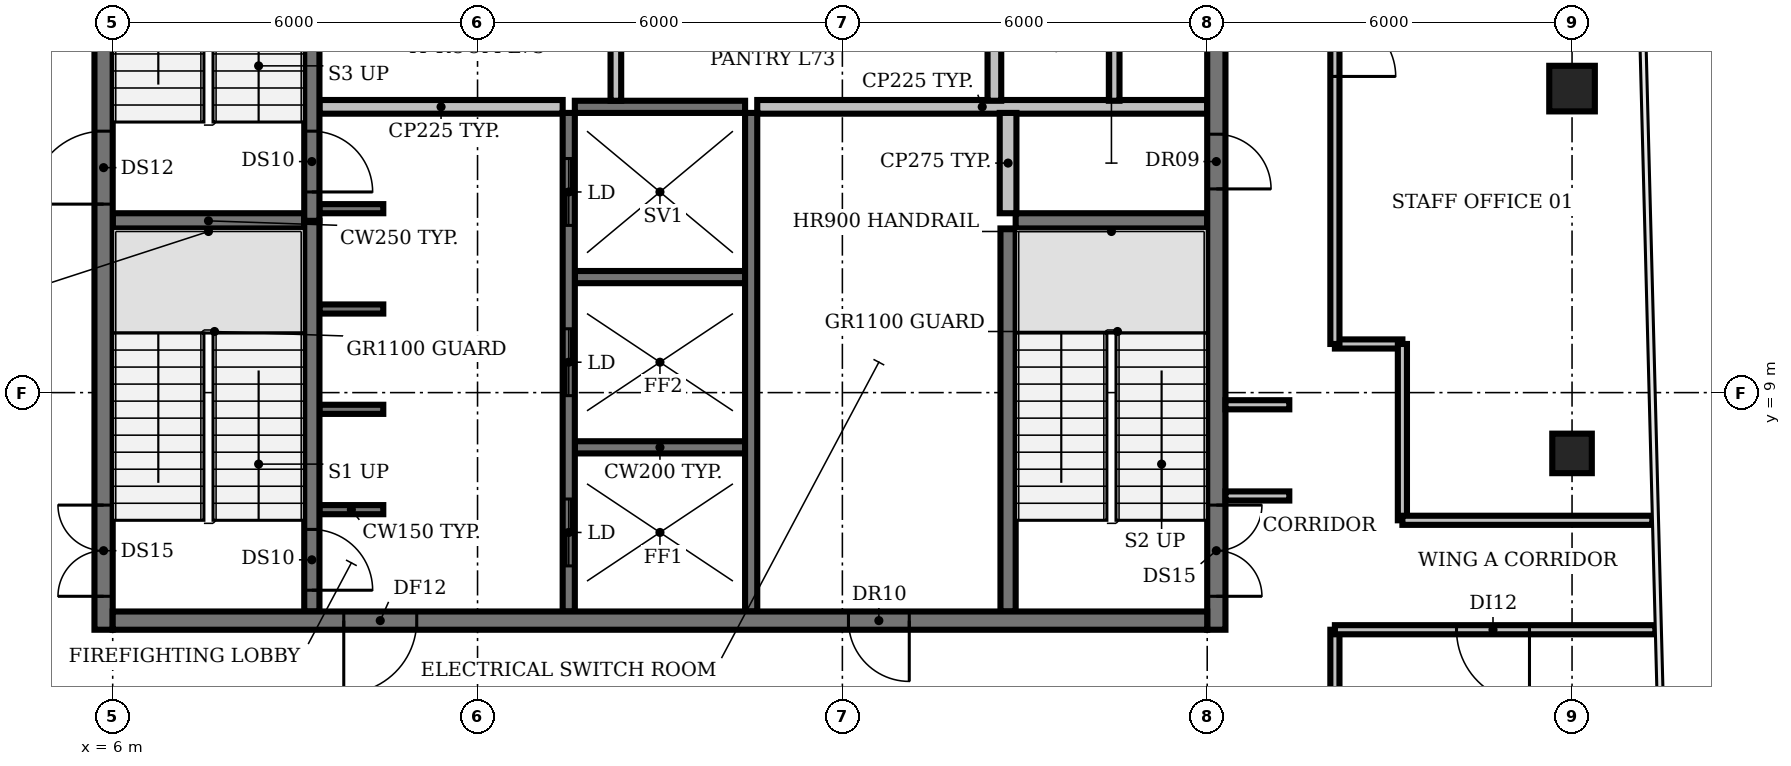
"""IFC4 building model, lengths in metres.
Left out: names, types, materials, properties, quantities, classifications, styles, units other than length and angle.
Written with IfcOpenShell. Run it as: python <this file> out.ifc"""

import sys

from ifc_helpers import new_model, si_unit, direction, frame, frame_2d, origin, origin_2d, place, context, subcontext, project, spatial, rectangle, circle, extrude, element, fill, save


model = new_model("IFC4")
c1 = context("Model", 3, precision=1e-05, world=origin(), true_north=direction((0.0, 1.0)))
c2 = subcontext(c1, "Body", "Model", "MODEL_VIEW")
j1 = project(units=[si_unit("LENGTHUNIT", "METRE"), si_unit("PLANEANGLEUNIT", "RADIAN")], contexts=[c1])
p1 = place(None, origin())
s1 = spatial("IfcSite", under=j1, at=p1, CompositionType="ELEMENT")
p2 = place(p1, origin())
s2 = spatial("IfcBuilding", under=s1, at=p2, CompositionType="ELEMENT")
p3 = place(p2, frame((0.0, 0.0, 327.2)))
s3 = spatial("IfcBuildingStorey", under=s2, at=p3, CompositionType="ELEMENT", Elevation=327.2)
p4 = place(p3, frame((30.0, 8.0, 0.0), z_axis=(0.0, 0.0, 1.0), x_axis=(1.0, 0.0, 0.0)))
e1 = element("IfcColumn", 1, at=p4, inside=s3, PredefinedType="COLUMN", context=c2, shape_type="SweptSolid", body=[
    extrude(rectangle(XDim=0.65, YDim=0.65, at=origin_2d()), origin(), (0.0, 0.0, 1.0), 3.9),
])
p5 = place(p3, frame((30.0, 14.0, 0.0), z_axis=(0.0, 0.0, 1.0), x_axis=(1.0, 0.0, 0.0)))
e2 = element("IfcColumn", 2, at=p5, inside=s3, PredefinedType="COLUMN", context=c2, shape_type="SweptSolid", body=[
    extrude(circle(Radius=0.375, at=origin_2d()), origin(), (0.0, 0.0, 1.0), 3.9),
])
p6 = place(p3, frame((9.4, 7.075, 0.0), z_axis=(0.0, 0.0, 1.0), x_axis=(1.0, 0.0, 0.0)))
e3 = element("IfcWall", 3, at=p6, inside=s3, PredefinedType="SHEAR", context=c2, shape_type="SweptSolid", body=[
    extrude(rectangle(XDim=1.05, YDim=0.15, at=frame_2d((0.525, 0.0))), origin(), (0.0, 0.0, 1.0), 3.9),
])
p7 = place(p3, frame((13.6, 8.1, 0.0), z_axis=(0.0, 0.0, 1.0), x_axis=(1.0, 0.0, 0.0)))
e4 = element("IfcWall", 4, at=p7, inside=s3, PredefinedType="SHEAR", context=c2, shape_type="SweptSolid", body=[
    extrude(rectangle(XDim=2.8, YDim=0.2, at=frame_2d((1.4, 0.0))), origin(), (0.0, 0.0, 1.0), 3.9),
])
for number, where, z_axis, x_axis in (
    (5, (9.4, 8.725, 0.0), (0.0, 0.0, 1.0), (1.0, 0.0, 0.0)),
    (6, (9.4, 10.375, 0.0), (0.0, 0.0, 1.0), (1.0, 0.0, 0.0)),
):
    element("IfcWall", number, at=place(p3, frame(where, z_axis=z_axis, x_axis=x_axis)), inside=s3, PredefinedType="SHEAR", context=c2, shape_type="SweptSolid", body=[
        extrude(rectangle(XDim=1.05, YDim=0.15, at=frame_2d((0.525, 0.0))), origin(), (0.0, 0.0, 1.0), 3.9),
    ])
p8 = place(p3, frame((13.6, 10.9, 0.0), z_axis=(0.0, 0.0, 1.0), x_axis=(1.0, 0.0, 0.0)))
e7 = element("IfcWall", 7, at=p8, inside=s3, PredefinedType="SHEAR", context=c2, shape_type="SweptSolid", body=[
    extrude(rectangle(XDim=2.8, YDim=0.2, at=frame_2d((1.4, 0.0))), origin(), (0.0, 0.0, 1.0), 3.9),
])
for number, where, z_axis, x_axis in (
    (8, (6.0, 11.825, 0.0), (0.0, 0.0, 1.0), (1.0, 0.0, 0.0)),
    (9, (20.85, 11.825, 0.0), (0.0, 0.0, 1.0), (1.0, 0.0, 0.0)),
):
    element("IfcWall", number, at=place(p3, frame(where, z_axis=z_axis, x_axis=x_axis)), inside=s3, PredefinedType="SHEAR", context=c2, shape_type="SweptSolid", body=[
        extrude(rectangle(XDim=3.15, YDim=0.25, at=frame_2d((1.575, 0.0))), origin(), (0.0, 0.0, 1.0), 3.9),
    ])
p9 = place(p3, frame((9.4, 12.025, 0.0), z_axis=(0.0, 0.0, 1.0), x_axis=(1.0, 0.0, 0.0)))
e10 = element("IfcWall", 10, at=p9, inside=s3, PredefinedType="SHEAR", context=c2, shape_type="SweptSolid", body=[
    extrude(rectangle(XDim=1.05, YDim=0.15, at=frame_2d((0.525, 0.0))), origin(), (0.0, 0.0, 1.0), 3.9),
])
p10 = place(p3, frame((9.4, 13.7, 0.0), z_axis=(0.0, 0.0, 1.0), x_axis=(1.0, 0.0, 0.0)))
e11 = element("IfcWall", 11, at=p10, inside=s3, PredefinedType="PARTITIONING", context=c2, shape_type="SweptSolid", body=[
    extrude(rectangle(XDim=4.0, YDim=0.225, at=frame_2d((2.0, 0.0))), origin(), (0.0, 0.0, 1.0), 3.9),
])
p11 = place(p3, frame((13.6, 13.7, 0.0), z_axis=(0.0, 0.0, 1.0), x_axis=(1.0, 0.0, 0.0)))
e12 = element("IfcWall", 12, at=p11, inside=s3, PredefinedType="SHEAR", context=c2, shape_type="SweptSolid", body=[
    extrude(rectangle(XDim=2.8, YDim=0.2, at=frame_2d((1.4, 0.0))), origin(), (0.0, 0.0, 1.0), 3.9),
])
p12 = place(p3, frame((16.6, 13.7, 0.0), z_axis=(0.0, 0.0, 1.0), x_axis=(1.0, 0.0, 0.0)))
e13 = element("IfcWall", 13, at=p12, inside=s3, PredefinedType="PARTITIONING", context=c2, shape_type="SweptSolid", body=[
    extrude(rectangle(XDim=7.4, YDim=0.225, at=frame_2d((3.7, 0.0))), origin(), (0.0, 0.0, 1.0), 3.9),
])
p13 = place(p3, frame((9.275, 11.825, 0.0), z_axis=(0.0, 0.0, 1.0), x_axis=(0.0, -1.0, 0.0)))
e14 = element("IfcWall", 14, at=p13, inside=s3, PredefinedType="SHEAR", context=c2, shape_type="SweptSolid", body=[
    extrude(rectangle(XDim=6.425, YDim=0.25, at=frame_2d((3.212, 0.0))), origin(), (0.0, 0.0, 1.0), 3.9),
])
p14 = place(p13, frame((5.075, 0.0, 0.0)))
e15 = element("IfcOpeningElement", 15, at=p14, cuts=e14, PredefinedType="OPENING", context=c2, shape_type="SweptSolid", body=[
    extrude(rectangle(XDim=1.0, YDim=2.1, at=frame_2d((0.5, 1.05))), frame((0.0, 0.135, 0.0), z_axis=(0.0, -1.0, 0.0), x_axis=(1.0, 0.0, 0.0)), (0.0, 0.0, 1.0), 0.27),
])
p15 = place(p3, frame((9.275, 18.375, 0.0), z_axis=(0.0, 0.0, 1.0), x_axis=(0.0, -1.0, 0.0)))
e16 = element("IfcWall", 16, at=p15, inside=s3, PredefinedType="SHEAR", context=c2, shape_type="SweptSolid", body=[
    extrude(rectangle(XDim=6.55, YDim=0.25, at=frame_2d((3.275, 0.0))), origin(), (0.0, 0.0, 1.0), 3.9),
])
p16 = place(p15, frame((5.075, 0.0, 0.0)))
e17 = element("IfcOpeningElement", 17, at=p16, cuts=e16, PredefinedType="OPENING", context=c2, shape_type="SweptSolid", body=[
    extrude(rectangle(XDim=1.0, YDim=2.1, at=frame_2d((0.5, 1.05))), frame((0.0, 0.135, 0.0), z_axis=(0.0, -1.0, 0.0), x_axis=(1.0, 0.0, 0.0)), (0.0, 0.0, 1.0), 0.27),
])
p17 = place(p3, frame((13.5, 5.4, 0.0), z_axis=(0.0, 0.0, 1.0), x_axis=(0.0, 1.0, 0.0)))
e18 = element("IfcWall", 18, at=p17, inside=s3, PredefinedType="SHEAR", context=c2, shape_type="SweptSolid", body=[
    extrude(rectangle(XDim=8.2, YDim=0.2, at=frame_2d((4.1, 0.0))), origin(), (0.0, 0.0, 1.0), 3.9),
])
p18 = place(p17, frame((0.75, 0.0, 0.0)))
e19 = element("IfcOpeningElement", 19, at=p18, cuts=e18, PredefinedType="OPENING", context=c2, shape_type="SweptSolid", body=[
    extrude(rectangle(XDim=1.1, YDim=2.1, at=frame_2d((0.55, 1.05))), frame((0.0, 0.11, 0.0), z_axis=(0.0, -1.0, 0.0), x_axis=(1.0, 0.0, 0.0)), (0.0, 0.0, 1.0), 0.22),
])
p19 = place(p17, frame((3.55, 0.0, 0.0)))
e20 = element("IfcOpeningElement", 20, at=p19, cuts=e18, PredefinedType="OPENING", context=c2, shape_type="SweptSolid", body=[
    extrude(rectangle(XDim=1.1, YDim=2.1, at=frame_2d((0.55, 1.05))), frame((0.0, 0.11, 0.0), z_axis=(0.0, -1.0, 0.0), x_axis=(1.0, 0.0, 0.0)), (0.0, 0.0, 1.0), 0.22),
])
p20 = place(p17, frame((6.35, 0.0, 0.0)))
e21 = element("IfcOpeningElement", 21, at=p20, cuts=e18, PredefinedType="OPENING", context=c2, shape_type="SweptSolid", body=[
    extrude(rectangle(XDim=1.1, YDim=2.1, at=frame_2d((0.55, 1.05))), frame((0.0, 0.11, 0.0), z_axis=(0.0, -1.0, 0.0), x_axis=(1.0, 0.0, 0.0)), (0.0, 0.0, 1.0), 0.22),
])
p21 = place(p3, frame((14.275, 13.8, 0.0), z_axis=(0.0, 0.0, 1.0), x_axis=(0.0, 1.0, 0.0)))
e22 = element("IfcWall", 22, at=p21, inside=s3, PredefinedType="PARTITIONING", context=c2, shape_type="SweptSolid", body=[
    extrude(rectangle(XDim=2.6, YDim=0.175, at=frame_2d((1.3, 0.0))), origin(), (0.0, 0.0, 1.0), 3.9),
])
p22 = place(p3, frame((16.5, 5.4, 0.0), z_axis=(0.0, 0.0, 1.0), x_axis=(0.0, 1.0, 0.0)))
e23 = element("IfcWall", 23, at=p22, inside=s3, PredefinedType="SHEAR", context=c2, shape_type="SweptSolid", body=[
    extrude(rectangle(XDim=8.2, YDim=0.2, at=frame_2d((4.1, 0.0))), origin(), (0.0, 0.0, 1.0), 3.9),
])
p23 = place(p3, frame((20.5, 13.8, 0.0), z_axis=(0.0, 0.0, 1.0), x_axis=(0.0, 1.0, 0.0)))
e24 = element("IfcWall", 24, at=p23, inside=s3, PredefinedType="PARTITIONING", context=c2, shape_type="SweptSolid", body=[
    extrude(rectangle(XDim=2.6, YDim=0.225, at=frame_2d((1.3, 0.0))), origin(), (0.0, 0.0, 1.0), 3.9),
])
p24 = place(p3, frame((20.725, 5.4, 0.0), z_axis=(0.0, 0.0, 1.0), x_axis=(0.0, 1.0, 0.0)))
e25 = element("IfcWall", 25, at=p24, inside=s3, PredefinedType="SHEAR", context=c2, shape_type="SweptSolid", body=[
    extrude(rectangle(XDim=6.3, YDim=0.25, at=frame_2d((3.15, 0.0))), origin(), (0.0, 0.0, 1.0), 3.9),
])
p25 = place(p3, frame((20.725, 11.95, 0.0), z_axis=(0.0, 0.0, 1.0), x_axis=(0.0, 1.0, 0.0)))
e26 = element("IfcWall", 26, at=p25, inside=s3, PredefinedType="PARTITIONING", context=c2, shape_type="SweptSolid", body=[
    extrude(rectangle(XDim=1.65, YDim=0.275, at=frame_2d((0.825, 0.0))), origin(), (0.0, 0.0, 1.0), 3.9),
])
p26 = place(p3, frame((22.47, 13.8, 0.0), z_axis=(0.0, 0.0, 1.0), x_axis=(0.0, 1.0, 0.0)))
e27 = element("IfcWall", 27, at=p26, inside=s3, PredefinedType="PARTITIONING", context=c2, shape_type="SweptSolid", body=[
    extrude(rectangle(XDim=2.6, YDim=0.175, at=frame_2d((1.3, 0.0))), origin(), (0.0, 0.0, 1.0), 3.9),
])
p27 = place(p3, frame((5.85, 5.1, 0.0), z_axis=(0.0, 0.0, 1.0), x_axis=(0.0, 1.0, 0.0)))
e28 = element("IfcWall", 28, at=p27, inside=s3, PredefinedType="SHEAR", context=c2, shape_type="SweptSolid", body=[
    extrude(rectangle(XDim=20.0, YDim=0.3, at=frame_2d((10.0, 0.0))), origin(), (0.0, 0.0, 1.0), 3.9),
])
p28 = place(p27, frame((0.55, 0.0, 0.0)))
e29 = element("IfcOpeningElement", 29, at=p28, cuts=e28, PredefinedType="OPENING", context=c2, shape_type="SweptSolid", body=[
    extrude(rectangle(XDim=1.5, YDim=2.1, at=frame_2d((0.75, 1.05))), frame((0.0, 0.16, 0.0), z_axis=(0.0, -1.0, 0.0), x_axis=(1.0, 0.0, 0.0)), (0.0, 0.0, 1.0), 0.32),
])
p29 = place(p27, frame((7.0, 0.0, 0.0)))
e30 = element("IfcOpeningElement", 30, at=p29, cuts=e28, PredefinedType="OPENING", context=c2, shape_type="SweptSolid", body=[
    extrude(rectangle(XDim=1.2, YDim=2.1, at=frame_2d((0.6, 1.05))), frame((0.0, 0.16, 0.0), z_axis=(0.0, -1.0, 0.0), x_axis=(1.0, 0.0, 0.0)), (0.0, 0.0, 1.0), 0.32),
])
p30 = place(p27, frame((13.55, 0.0, 0.0)))
e31 = element("IfcOpeningElement", 31, at=p30, cuts=e28, PredefinedType="OPENING", context=c2, shape_type="SweptSolid", body=[
    extrude(rectangle(XDim=1.2, YDim=2.1, at=frame_2d((0.6, 1.05))), frame((0.0, 0.16, 0.0), z_axis=(0.0, -1.0, 0.0), x_axis=(1.0, 0.0, 0.0)), (0.0, 0.0, 1.0), 0.32),
])
p31 = place(p3, frame((24.15, 25.705, 0.0), z_axis=(0.0, 0.0, 1.0), x_axis=(0.0, -1.0, 0.0)))
e32 = element("IfcWall", 32, at=p31, inside=s3, PredefinedType="SHEAR", context=c2, shape_type="SweptSolid", body=[
    extrude(rectangle(XDim=20.605, YDim=0.3, at=frame_2d((10.302, 0.0))), origin(), (0.0, 0.0, 1.0), 3.9),
])
p32 = place(p31, frame((18.555, 0.0, 0.0)))
e33 = element("IfcOpeningElement", 33, at=p32, cuts=e32, PredefinedType="OPENING", context=c2, shape_type="SweptSolid", body=[
    extrude(rectangle(XDim=1.5, YDim=2.1, at=frame_2d((0.75, 1.05))), frame((0.0, 0.16, 0.0), z_axis=(0.0, -1.0, 0.0), x_axis=(1.0, 0.0, 0.0)), (0.0, 0.0, 1.0), 0.32),
])
p33 = place(p31, frame((12.455, 0.0, 0.0)))
e34 = element("IfcOpeningElement", 34, at=p33, cuts=e32, PredefinedType="OPENING", context=c2, shape_type="SweptSolid", body=[
    extrude(rectangle(XDim=0.9, YDim=2.1, at=frame_2d((0.45, 1.05))), frame((0.0, 0.16, 0.0), z_axis=(0.0, -1.0, 0.0), x_axis=(1.0, 0.0, 0.0)), (0.0, 0.0, 1.0), 0.32),
])
p34 = place(p31, frame((6.455, 0.0, 0.0)))
e35 = element("IfcOpeningElement", 35, at=p34, cuts=e32, PredefinedType="OPENING", context=c2, shape_type="SweptSolid", body=[
    extrude(rectangle(XDim=2.0, YDim=2.1, at=frame_2d((1.0, 1.05))), frame((0.0, 0.16, 0.0), z_axis=(0.0, -1.0, 0.0), x_axis=(1.0, 0.0, 0.0)), (0.0, 0.0, 1.0), 0.32),
])
p35 = place(p3, frame((24.0, 5.25, 0.0), z_axis=(0.0, 0.0, 1.0), x_axis=(-1.0, 0.0, 0.0)))
e36 = element("IfcWall", 36, at=p35, inside=s3, PredefinedType="SHEAR", context=c2, shape_type="SweptSolid", body=[
    extrude(rectangle(XDim=18.0, YDim=0.3, at=frame_2d((9.0, 0.0))), origin(), (0.0, 0.0, 1.0), 3.9),
])
p36 = place(p35, frame((13.0, 0.0, 0.0)))
e37 = element("IfcOpeningElement", 37, at=p36, cuts=e36, PredefinedType="OPENING", context=c2, shape_type="SweptSolid", body=[
    extrude(rectangle(XDim=1.2, YDim=2.1, at=frame_2d((0.6, 1.05))), frame((0.0, 0.16, 0.0), z_axis=(0.0, -1.0, 0.0), x_axis=(1.0, 0.0, 0.0)), (0.0, 0.0, 1.0), 0.32),
])
p37 = place(p35, frame((4.9, 0.0, 0.0)))
e38 = element("IfcOpeningElement", 38, at=p37, cuts=e36, PredefinedType="OPENING", context=c2, shape_type="SweptSolid", body=[
    extrude(rectangle(XDim=1.0, YDim=2.1, at=frame_2d((0.5, 1.05))), frame((0.0, 0.16, 0.0), z_axis=(0.0, -1.0, 0.0), x_axis=(1.0, 0.0, 0.0)), (0.0, 0.0, 1.0), 0.32),
])
for number, where, z_axis, x_axis in (
    (39, (24.3, 7.3, 0.0), (0.0, 0.0, 1.0), (1.0, 0.0, 0.0)),
    (40, (24.3, 8.8, 0.0), (0.0, 0.0, 1.0), (1.0, 0.0, 0.0)),
):
    element("IfcWall", number, at=place(p3, frame(where, z_axis=z_axis, x_axis=x_axis)), inside=s3, PredefinedType="PARTITIONING", context=c2, shape_type="SweptSolid", body=[
        extrude(rectangle(XDim=1.05, YDim=0.15, at=frame_2d((0.525, 0.0))), origin(), (0.0, 0.0, 1.0), 2.95),
    ])
p38 = place(p3, frame((26.1, 2.1, 0.0), z_axis=(0.0, 0.0, 1.0), x_axis=(0.0, 1.0, 0.0)))
e41 = element("IfcWall", 41, at=p38, inside=s3, PredefinedType="PARTITIONING", context=c2, shape_type="SweptSolid", body=[
    extrude(rectangle(XDim=3.0, YDim=0.15, at=frame_2d((1.5, 0.0))), origin(), (0.0, 0.0, 1.0), 2.95),
])
p39 = place(p3, frame((26.1, 9.8, 0.0), z_axis=(0.0, 0.0, 1.0), x_axis=(1.0, 0.0, 0.0)))
e42 = element("IfcWall", 42, at=p39, inside=s3, PredefinedType="PARTITIONING", context=c2, shape_type="SweptSolid", body=[
    extrude(rectangle(XDim=1.11, YDim=0.15, at=frame_2d((0.555, 0.0))), origin(), (0.0, 0.0, 1.0), 2.95),
])
p40 = place(p3, frame((26.1, 19.58, 0.0), z_axis=(0.0, 0.0, 1.0), x_axis=(0.0, -1.0, 0.0)))
e43 = element("IfcWall", 43, at=p40, inside=s3, PredefinedType="PARTITIONING", context=c2, shape_type="SweptSolid", body=[
    extrude(rectangle(XDim=9.78, YDim=0.15, at=frame_2d((4.89, 0.0))), origin(), (0.0, 0.0, 1.0), 2.95),
])
p41 = place(p40, frame((4.38, 0.0, 0.0)))
e44 = element("IfcOpeningElement", 44, at=p41, cuts=e43, PredefinedType="OPENING", context=c2, shape_type="SweptSolid", body=[
    extrude(rectangle(XDim=1.0, YDim=2.1, at=frame_2d((0.5, 1.05))), frame((0.0, 0.085, 0.0), z_axis=(0.0, -1.0, 0.0), x_axis=(1.0, 0.0, 0.0)), (0.0, 0.0, 1.0), 0.17),
])
p42 = place(p3, frame((27.21, 6.9, 0.0), z_axis=(0.0, 0.0, 1.0), x_axis=(0.0, 1.0, 0.0)))
e45 = element("IfcWall", 45, at=p42, inside=s3, PredefinedType="PARTITIONING", context=c2, shape_type="SweptSolid", body=[
    extrude(rectangle(XDim=2.9, YDim=0.15, at=frame_2d((1.45, 0.0))), origin(), (0.0, 0.0, 1.0), 2.95),
])
p43 = place(p3, frame((27.21, 6.9, 0.0), z_axis=(0.0, 0.0, 1.0), x_axis=(1.0, 0.0, 0.0)))
e46 = element("IfcWall", 46, at=p43, inside=s3, PredefinedType="PARTITIONING", context=c2, shape_type="SweptSolid", body=[
    extrude(rectangle(XDim=4.11, YDim=0.15, at=frame_2d((2.055, 0.0))), origin(), (0.0, 0.0, 1.0), 2.95),
])
p44 = place(p3, frame((31.37, 5.1, 0.0), z_axis=(0.0, 0.0, 1.0), x_axis=(-1.0, 0.0, 0.0)))
e47 = element("IfcWall", 47, at=p44, inside=s3, PredefinedType="PARTITIONING", context=c2, shape_type="SweptSolid", body=[
    extrude(rectangle(XDim=5.27, YDim=0.15, at=frame_2d((2.635, 0.0))), origin(), (0.0, 0.0, 1.0), 2.95),
])
p45 = place(p44, frame((2.07, 0.0, 0.0)))
e48 = element("IfcOpeningElement", 48, at=p45, cuts=e47, PredefinedType="OPENING", context=c2, shape_type="SweptSolid", body=[
    extrude(rectangle(XDim=1.2, YDim=2.1, at=frame_2d((0.6, 1.05))), frame((0.0, 0.085, 0.0), z_axis=(0.0, -1.0, 0.0), x_axis=(1.0, 0.0, 0.0)), (0.0, 0.0, 1.0), 0.17),
])
p46 = place(p14, origin())
e49 = element("IfcDoor", 49, at=p46, inside=s3, OperationType="SINGLE_SWING_RIGHT", PredefinedType="DOOR", context=c2, shape_type="SweptSolid", body=[
    extrude(rectangle(XDim=1.0, YDim=2.1, at=frame_2d((0.5, 1.05))), frame((0.0, 0.025, 0.0), z_axis=(0.0, -1.0, 0.0), x_axis=(1.0, 0.0, 0.0)), (0.0, 0.0, 1.0), 0.05),
])
fill(e15, e49)
p47 = place(p16, origin())
e50 = element("IfcDoor", 50, at=p47, inside=s3, OperationType="SINGLE_SWING_RIGHT", PredefinedType="DOOR", context=c2, shape_type="SweptSolid", body=[
    extrude(rectangle(XDim=1.0, YDim=2.1, at=frame_2d((0.5, 1.05))), frame((0.0, 0.025, 0.0), z_axis=(0.0, -1.0, 0.0), x_axis=(1.0, 0.0, 0.0)), (0.0, 0.0, 1.0), 0.05),
])
fill(e17, e50)
p48 = place(p18, origin())
e51 = element("IfcDoor", 51, at=p48, inside=s3, OperationType="DOUBLE_DOOR_SLIDING", PredefinedType="DOOR", context=c2, shape_type="SweptSolid", body=[
    extrude(rectangle(XDim=1.1, YDim=2.1, at=frame_2d((0.55, 1.05))), frame((0.0, 0.025, 0.0), z_axis=(0.0, -1.0, 0.0), x_axis=(1.0, 0.0, 0.0)), (0.0, 0.0, 1.0), 0.05),
])
fill(e19, e51)
p49 = place(p19, origin())
e52 = element("IfcDoor", 52, at=p49, inside=s3, OperationType="DOUBLE_DOOR_SLIDING", PredefinedType="DOOR", context=c2, shape_type="SweptSolid", body=[
    extrude(rectangle(XDim=1.1, YDim=2.1, at=frame_2d((0.55, 1.05))), frame((0.0, 0.025, 0.0), z_axis=(0.0, -1.0, 0.0), x_axis=(1.0, 0.0, 0.0)), (0.0, 0.0, 1.0), 0.05),
])
fill(e20, e52)
p50 = place(p20, origin())
e53 = element("IfcDoor", 53, at=p50, inside=s3, OperationType="DOUBLE_DOOR_SLIDING", PredefinedType="DOOR", context=c2, shape_type="SweptSolid", body=[
    extrude(rectangle(XDim=1.1, YDim=2.1, at=frame_2d((0.55, 1.05))), frame((0.0, 0.025, 0.0), z_axis=(0.0, -1.0, 0.0), x_axis=(1.0, 0.0, 0.0)), (0.0, 0.0, 1.0), 0.05),
])
fill(e21, e53)
p51 = place(p28, origin())
e54 = element("IfcDoor", 54, at=p51, inside=s3, OperationType="DOUBLE_DOOR_SINGLE_SWING", PredefinedType="DOOR", context=c2, shape_type="SweptSolid", body=[
    extrude(rectangle(XDim=1.5, YDim=2.1, at=frame_2d((0.75, 1.05))), frame((0.0, 0.025, 0.0), z_axis=(0.0, -1.0, 0.0), x_axis=(1.0, 0.0, 0.0)), (0.0, 0.0, 1.0), 0.05),
])
fill(e29, e54)
p52 = place(p29, origin())
e55 = element("IfcDoor", 55, at=p52, inside=s3, OperationType="SINGLE_SWING_LEFT", PredefinedType="DOOR", context=c2, shape_type="SweptSolid", body=[
    extrude(rectangle(XDim=1.2, YDim=2.1, at=frame_2d((0.6, 1.05))), frame((0.0, 0.025, 0.0), z_axis=(0.0, -1.0, 0.0), x_axis=(1.0, 0.0, 0.0)), (0.0, 0.0, 1.0), 0.05),
])
fill(e30, e55)
p53 = place(p32, origin())
e56 = element("IfcDoor", 56, at=p53, inside=s3, OperationType="DOUBLE_DOOR_SINGLE_SWING", PredefinedType="DOOR", context=c2, shape_type="SweptSolid", body=[
    extrude(rectangle(XDim=1.5, YDim=2.1, at=frame_2d((0.75, 1.05))), frame((0.0, 0.025, 0.0), z_axis=(0.0, -1.0, 0.0), x_axis=(1.0, 0.0, 0.0)), (0.0, 0.0, 1.0), 0.05),
])
fill(e33, e56)
p54 = place(p33, origin())
e57 = element("IfcDoor", 57, at=p54, inside=s3, OperationType="SINGLE_SWING_RIGHT", PredefinedType="DOOR", context=c2, shape_type="SweptSolid", body=[
    extrude(rectangle(XDim=0.9, YDim=2.1, at=frame_2d((0.45, 1.05))), frame((0.0, 0.025, 0.0), z_axis=(0.0, -1.0, 0.0), x_axis=(1.0, 0.0, 0.0)), (0.0, 0.0, 1.0), 0.05),
])
fill(e34, e57)
p55 = place(p36, origin())
e58 = element("IfcDoor", 58, at=p55, inside=s3, OperationType="SINGLE_SWING_RIGHT", PredefinedType="DOOR", context=c2, shape_type="SweptSolid", body=[
    extrude(rectangle(XDim=1.2, YDim=2.1, at=frame_2d((0.6, 1.05))), frame((0.0, 0.025, 0.0), z_axis=(0.0, -1.0, 0.0), x_axis=(1.0, 0.0, 0.0)), (0.0, 0.0, 1.0), 0.05),
])
fill(e37, e58)
p56 = place(p37, origin())
e59 = element("IfcDoor", 59, at=p56, inside=s3, OperationType="SINGLE_SWING_LEFT", PredefinedType="DOOR", context=c2, shape_type="SweptSolid", body=[
    extrude(rectangle(XDim=1.0, YDim=2.1, at=frame_2d((0.5, 1.05))), frame((0.0, 0.025, 0.0), z_axis=(0.0, -1.0, 0.0), x_axis=(1.0, 0.0, 0.0)), (0.0, 0.0, 1.0), 0.05),
])
fill(e38, e59)
p57 = place(p41, origin())
e60 = element("IfcDoor", 60, at=p57, inside=s3, OperationType="SINGLE_SWING_RIGHT", PredefinedType="DOOR", context=c2, shape_type="SweptSolid", body=[
    extrude(rectangle(XDim=1.0, YDim=2.1, at=frame_2d((0.5, 1.05))), frame((0.0, 0.025, 0.0), z_axis=(0.0, -1.0, 0.0), x_axis=(1.0, 0.0, 0.0)), (0.0, 0.0, 1.0), 0.05),
])
fill(e44, e60)
p58 = place(p45, origin())
e61 = element("IfcDoor", 61, at=p58, inside=s3, OperationType="SINGLE_SWING_LEFT", PredefinedType="DOOR", context=c2, shape_type="SweptSolid", body=[
    extrude(rectangle(XDim=1.2, YDim=2.1, at=frame_2d((0.6, 1.05))), frame((0.0, 0.025, 0.0), z_axis=(0.0, -1.0, 0.0), x_axis=(1.0, 0.0, 0.0)), (0.0, 0.0, 1.0), 0.05),
])
fill(e48, e61)
save(model, sys.argv[1])
